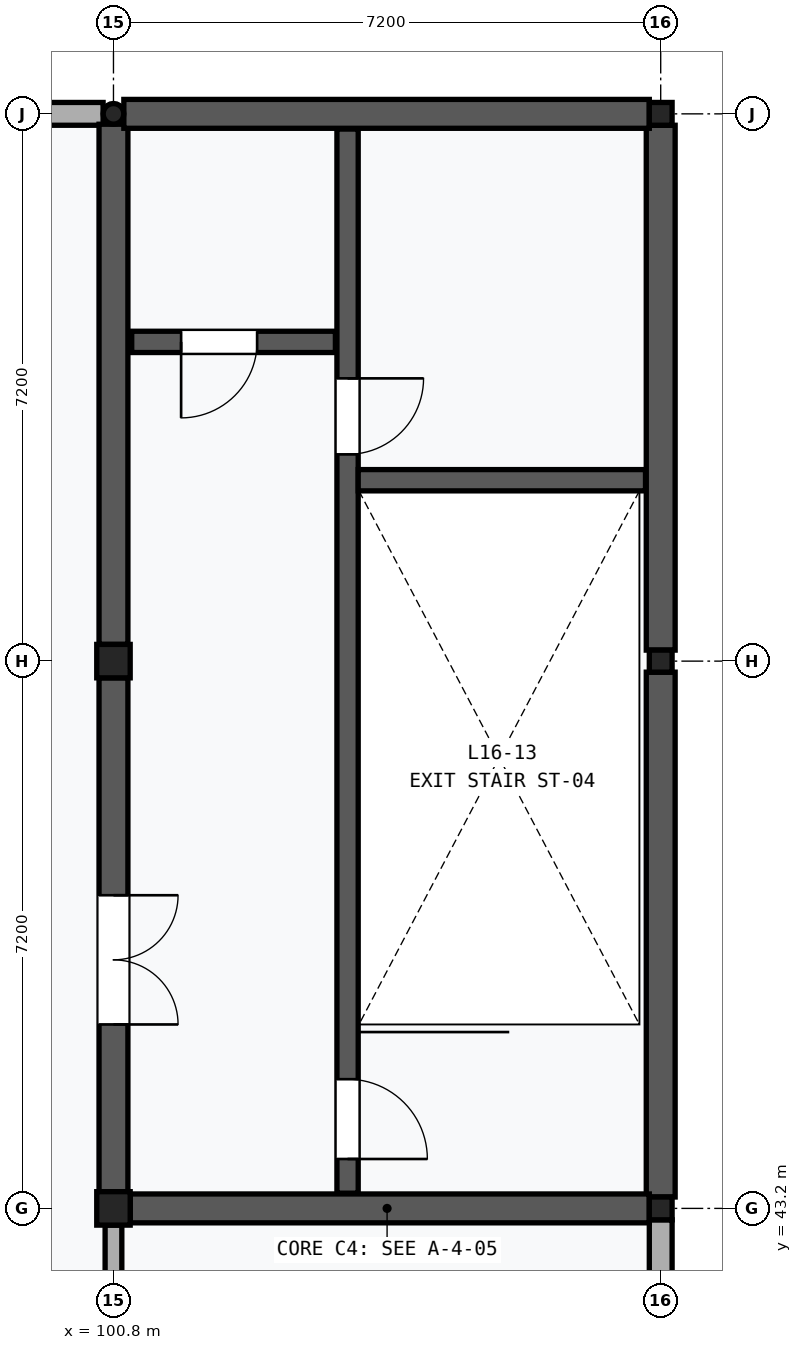
"""IFC4 building model, lengths in metres.
Left out: names, types, materials, properties, quantities, classifications, styles, units other than length and angle.
Written with IfcOpenShell. Run it as: python <this file> out.ifc"""

import sys

from ifc_helpers import new_model, si_unit, direction, frame, frame_2d, origin, origin_2d, place, context, subcontext, project, spatial, rectangle, hollow_circle, i_section, extrude, element, fill, save


model = new_model("IFC4")
c1 = context("Model", 3, precision=1e-05, world=origin(), true_north=direction((0.0, 1.0)))
c2 = subcontext(c1, "Body", "Model", "MODEL_VIEW")
j1 = project(units=[si_unit("LENGTHUNIT", "METRE"), si_unit("PLANEANGLEUNIT", "RADIAN")], contexts=[c1])
p1 = place(None, origin())
s1 = spatial("IfcSite", under=j1, at=p1, CompositionType="ELEMENT")
p2 = place(p1, origin())
s2 = spatial("IfcBuilding", under=s1, at=p2, CompositionType="ELEMENT")
p3 = place(p2, frame((0.0, 0.0, 67.2)))
s3 = spatial("IfcBuildingStorey", under=s2, at=p3, CompositionType="ELEMENT", Elevation=67.2)
for number, where, z_axis, x_axis in (
    (1, (100.8, 43.2, 0.0), (0.0, 0.0, 1.0), (1.0, 0.0, 0.0)),
    (2, (100.8, 50.4, 0.0), (0.0, 0.0, 1.0), (1.0, 0.0, 0.0)),
):
    element("IfcColumn", number, at=place(p3, frame(where, z_axis=z_axis, x_axis=x_axis)), inside=s3, PredefinedType="COLUMN", context=c2, shape_type="SweptSolid", body=[
        extrude(rectangle(XDim=0.44, YDim=0.44, at=origin_2d()), origin(), (0.0, 0.0, 1.0), 4.8),
    ])
p4 = place(p3, frame((100.8, 57.6, 0.0), z_axis=(0.0, 0.0, 1.0), x_axis=(1.0, 0.0, 0.0)))
e3 = element("IfcColumn", 3, at=p4, inside=s3, PredefinedType="COLUMN", context=c2, shape_type="SweptSolid", body=[
    extrude(hollow_circle(Radius=0.136, WallThickness=0.012, at=origin_2d()), origin(), (0.0, 0.0, 1.0), 4.8),
])
p5 = place(p3, frame((108.0, 43.2, 0.0), z_axis=(0.0, 0.0, 1.0), x_axis=(1.0, 0.0, 0.0)))
e4 = element("IfcColumn", 4, at=p5, inside=s3, PredefinedType="COLUMN", context=c2, shape_type="SweptSolid", body=[
    extrude(i_section(OverallWidth=0.3, OverallDepth=0.3, WebThickness=0.011, FlangeThickness=0.019, FilletRadius=0.027, at=origin_2d()), origin(), (0.0, 0.0, 1.0), 4.8),
])
p6 = place(p3, frame((108.0, 50.4, 0.0), z_axis=(0.0, 0.0, 1.0), x_axis=(1.0, 0.0, 0.0)))
e5 = element("IfcColumn", 5, at=p6, inside=s3, PredefinedType="COLUMN", context=c2, shape_type="SweptSolid", body=[
    extrude(i_section(OverallWidth=0.3, OverallDepth=0.29, WebThickness=0.009, FlangeThickness=0.014, FilletRadius=0.027, at=origin_2d()), origin(), (0.0, 0.0, 1.0), 4.8),
])
p7 = place(p3, frame((108.0, 57.6, 0.0), z_axis=(0.0, 0.0, 1.0), x_axis=(1.0, 0.0, 0.0)))
e6 = element("IfcColumn", 6, at=p7, inside=s3, PredefinedType="COLUMN", context=c2, shape_type="SweptSolid", body=[
    extrude(i_section(OverallWidth=0.3, OverallDepth=0.3, WebThickness=0.011, FlangeThickness=0.019, FilletRadius=0.027, at=origin_2d()), origin(), (0.0, 0.0, 1.0), 4.8),
])
p8 = place(p3, frame((93.675, 57.6, 0.0), z_axis=(0.0, 0.0, 1.0), x_axis=(1.0, 0.0, 0.0)))
e7 = element("IfcWall", 7, at=p8, inside=s3, PredefinedType="SOLIDWALL", context=c2, shape_type="SweptSolid", body=[
    extrude(rectangle(XDim=6.989, YDim=0.3, at=frame_2d((3.494, 0.0))), origin(), (0.0, 0.0, 1.0), 4.16),
])
p9 = place(p8, frame((2.619, 0.0, 1.2)))
e8 = element("IfcOpeningElement", 8, at=p9, cuts=e7, PredefinedType="OPENING", context=c2, shape_type="SweptSolid", body=[
    extrude(rectangle(XDim=1.75, YDim=1.35, at=frame_2d((0.875, 0.675))), frame((0.0, 0.162, 0.0), z_axis=(0.0, -1.0, 0.0), x_axis=(1.0, 0.0, 0.0)), (0.0, 0.0, 1.0), 0.324),
])
p10 = place(p3, frame((108.0, 36.145, 0.0), z_axis=(0.0, 0.0, 1.0), x_axis=(0.0, 1.0, 0.0)))
e9 = element("IfcWall", 9, at=p10, inside=s3, PredefinedType="SOLIDWALL", context=c2, shape_type="SweptSolid", body=[
    extrude(rectangle(XDim=6.905, YDim=0.3, at=frame_2d((3.453, 0.0))), origin(), (0.0, 0.0, 1.0), 4.16),
])
p11 = place(p10, frame((2.702, 0.0, 1.2)))
e10 = element("IfcOpeningElement", 10, at=p11, cuts=e9, PredefinedType="OPENING", context=c2, shape_type="SweptSolid", body=[
    extrude(rectangle(XDim=1.5, YDim=1.35, at=frame_2d((0.75, 0.675))), frame((0.0, 0.162, 0.0), z_axis=(0.0, -1.0, 0.0), x_axis=(1.0, 0.0, 0.0)), (0.0, 0.0, 1.0), 0.324),
])
p12 = place(p3, frame((100.8, 43.42, 0.0), z_axis=(0.0, 0.0, 1.0), x_axis=(0.0, 1.0, 0.0)))
e11 = element("IfcWall", 11, at=p12, inside=s3, PredefinedType="SHEAR", context=c2, shape_type="SweptSolid", body=[
    extrude(rectangle(XDim=6.76, YDim=0.38, at=frame_2d((3.38, 0.0))), origin(), (0.0, 0.0, 1.0), 4.26),
])
p13 = place(p12, frame((2.2, 0.0, 0.0)))
e12 = element("IfcOpeningElement", 12, at=p13, cuts=e11, PredefinedType="OPENING", context=c2, shape_type="SweptSolid", body=[
    extrude(rectangle(XDim=1.7, YDim=2.25, at=frame_2d((0.85, 1.125))), frame((0.0, 0.202, 0.0), z_axis=(0.0, -1.0, 0.0), x_axis=(1.0, 0.0, 0.0)), (0.0, 0.0, 1.0), 0.404),
])
p14 = place(p3, frame((100.8, 50.62, 0.0), z_axis=(0.0, 0.0, 1.0), x_axis=(0.0, 1.0, 0.0)))
e13 = element("IfcWall", 13, at=p14, inside=s3, PredefinedType="SHEAR", context=c2, shape_type="SweptSolid", body=[
    extrude(rectangle(XDim=6.843, YDim=0.38, at=frame_2d((3.422, 0.0))), origin(), (0.0, 0.0, 1.0), 4.26),
])
p15 = place(p3, frame((108.0, 43.35, 0.0), z_axis=(0.0, 0.0, 1.0), x_axis=(0.0, 1.0, 0.0)))
e14 = element("IfcWall", 14, at=p15, inside=s3, PredefinedType="SHEAR", context=c2, shape_type="SweptSolid", body=[
    extrude(rectangle(XDim=6.905, YDim=0.38, at=frame_2d((3.452, 0.0))), origin(), (0.0, 0.0, 1.0), 4.16),
])
p16 = place(p3, frame((108.0, 50.545, 0.0), z_axis=(0.0, 0.0, 1.0), x_axis=(0.0, 1.0, 0.0)))
e15 = element("IfcWall", 15, at=p16, inside=s3, PredefinedType="SHEAR", context=c2, shape_type="SweptSolid", body=[
    extrude(rectangle(XDim=6.905, YDim=0.38, at=frame_2d((3.453, 0.0))), origin(), (0.0, 0.0, 1.0), 4.16),
])
p17 = place(p3, frame((101.02, 43.2, 0.0), z_axis=(0.0, 0.0, 1.0), x_axis=(1.0, 0.0, 0.0)))
e16 = element("IfcWall", 16, at=p17, inside=s3, PredefinedType="SHEAR", context=c2, shape_type="SweptSolid", body=[
    extrude(rectangle(XDim=6.83, YDim=0.38, at=frame_2d((3.415, 0.0))), origin(), (0.0, 0.0, 1.0), 4.2),
])
p18 = place(p3, frame((100.937, 57.6, 0.0), z_axis=(0.0, 0.0, 1.0), x_axis=(1.0, 0.0, 0.0)))
e17 = element("IfcWall", 17, at=p18, inside=s3, PredefinedType="SHEAR", context=c2, shape_type="SweptSolid", body=[
    extrude(rectangle(XDim=6.914, YDim=0.38, at=frame_2d((3.457, 0.0))), origin(), (0.0, 0.0, 1.0), 4.16),
])
p19 = place(p3, frame((103.88, 43.4, 0.0), z_axis=(0.0, 0.0, 1.0), x_axis=(0.0, 1.0, 0.0)))
e18 = element("IfcWall", 18, at=p19, inside=s3, PredefinedType="SHEAR", context=c2, shape_type="SweptSolid", body=[
    extrude(rectangle(XDim=14.0, YDim=0.28, at=frame_2d((7.0, 0.0))), origin(), (0.0, 0.0, 1.0), 4.54),
])
p20 = place(p19, frame((0.45, 0.0, 0.0)))
e19 = element("IfcOpeningElement", 19, at=p20, cuts=e18, PredefinedType="OPENING", context=c2, shape_type="SweptSolid", body=[
    extrude(rectangle(XDim=1.05, YDim=2.15, at=frame_2d((0.525, 1.075))), frame((0.0, 0.152, 0.0), z_axis=(0.0, -1.0, 0.0), x_axis=(1.0, 0.0, 0.0)), (0.0, 0.0, 1.0), 0.304),
])
p21 = place(p19, frame((9.72, 0.0, 0.0)))
e20 = element("IfcOpeningElement", 20, at=p21, cuts=e18, PredefinedType="OPENING", context=c2, shape_type="SweptSolid", body=[
    extrude(rectangle(XDim=1.0, YDim=2.15, at=frame_2d((0.5, 1.075))), frame((0.0, 0.152, 0.0), z_axis=(0.0, -1.0, 0.0), x_axis=(1.0, 0.0, 0.0)), (0.0, 0.0, 1.0), 0.304),
])
p22 = place(p3, frame((104.02, 52.78, 0.0), z_axis=(0.0, 0.0, 1.0), x_axis=(1.0, 0.0, 0.0)))
e21 = element("IfcWall", 21, at=p22, inside=s3, PredefinedType="SHEAR", context=c2, shape_type="SweptSolid", body=[
    extrude(rectangle(XDim=3.78, YDim=0.28, at=frame_2d((1.89, 0.0))), origin(), (0.0, 0.0, 1.0), 4.54),
])
p23 = place(p3, frame((101.04, 54.6, 0.0), z_axis=(0.0, 0.0, 1.0), x_axis=(1.0, 0.0, 0.0)))
e22 = element("IfcWall", 22, at=p23, inside=s3, PredefinedType="SHEAR", context=c2, shape_type="SweptSolid", body=[
    extrude(rectangle(XDim=2.68, YDim=0.28, at=frame_2d((1.34, 0.0))), origin(), (0.0, 0.0, 1.0), 4.54),
])
p24 = place(p23, frame((0.65, 0.0, 0.0)))
e23 = element("IfcOpeningElement", 23, at=p24, cuts=e22, PredefinedType="OPENING", context=c2, shape_type="SweptSolid", body=[
    extrude(rectangle(XDim=1.0, YDim=2.15, at=frame_2d((0.5, 1.075))), frame((0.0, 0.152, 0.0), z_axis=(0.0, -1.0, 0.0), x_axis=(1.0, 0.0, 0.0)), (0.0, 0.0, 1.0), 0.304),
])
p25 = place(p3, frame((100.8, 36.22, 0.0), z_axis=(0.0, 0.0, 1.0), x_axis=(0.0, 1.0, 0.0)))
e24 = element("IfcWall", 24, at=p25, inside=s3, PredefinedType="PARTITIONING", context=c2, shape_type="SweptSolid", body=[
    extrude(rectangle(XDim=6.76, YDim=0.22, at=frame_2d((3.38, 0.0))), origin(), (0.0, 0.0, 1.0), 4.26),
])
p26 = place(p13, frame((1.7, 0.0, 0.0), z_axis=(0.0, 0.0, 1.0), x_axis=(-1.0, 0.0, 0.0)))
e25 = element("IfcDoor", 25, at=p26, inside=s3, OperationType="DOUBLE_DOOR_SINGLE_SWING", PredefinedType="DOOR", context=c2, shape_type="SweptSolid", body=[
    extrude(rectangle(XDim=1.7, YDim=2.25, at=frame_2d((0.85, 1.125))), frame((0.0, 0.025, 0.0), z_axis=(0.0, -1.0, 0.0), x_axis=(1.0, 0.0, 0.0)), (0.0, 0.0, 1.0), 0.05),
])
fill(e12, e25)
p27 = place(p20, frame((1.05, 0.0, 0.0), z_axis=(0.0, 0.0, 1.0), x_axis=(-1.0, 0.0, 0.0)))
e26 = element("IfcDoor", 26, at=p27, inside=s3, OperationType="SINGLE_SWING_RIGHT", PredefinedType="DOOR", context=c2, shape_type="SweptSolid", body=[
    extrude(rectangle(XDim=1.05, YDim=2.15, at=frame_2d((0.525, 1.075))), frame((0.0, 0.025, 0.0), z_axis=(0.0, -1.0, 0.0), x_axis=(1.0, 0.0, 0.0)), (0.0, 0.0, 1.0), 0.05),
])
fill(e19, e26)
p28 = place(p21, frame((1.0, 0.0, 0.0), z_axis=(0.0, 0.0, 1.0), x_axis=(-1.0, 0.0, 0.0)))
e27 = element("IfcDoor", 27, at=p28, inside=s3, OperationType="SINGLE_SWING_LEFT", PredefinedType="DOOR", context=c2, shape_type="SweptSolid", body=[
    extrude(rectangle(XDim=1.0, YDim=2.15, at=frame_2d((0.5, 1.075))), frame((0.0, 0.025, 0.0), z_axis=(0.0, -1.0, 0.0), x_axis=(1.0, 0.0, 0.0)), (0.0, 0.0, 1.0), 0.05),
])
fill(e20, e27)
p29 = place(p24, frame((1.0, 0.0, 0.0), z_axis=(0.0, 0.0, 1.0), x_axis=(-1.0, 0.0, 0.0)))
e28 = element("IfcDoor", 28, at=p29, inside=s3, OperationType="SINGLE_SWING_RIGHT", PredefinedType="DOOR", context=c2, shape_type="SweptSolid", body=[
    extrude(rectangle(XDim=1.0, YDim=2.15, at=frame_2d((0.5, 1.075))), frame((0.0, 0.025, 0.0), z_axis=(0.0, -1.0, 0.0), x_axis=(1.0, 0.0, 0.0)), (0.0, 0.0, 1.0), 0.05),
])
fill(e23, e28)
save(model, sys.argv[1])
